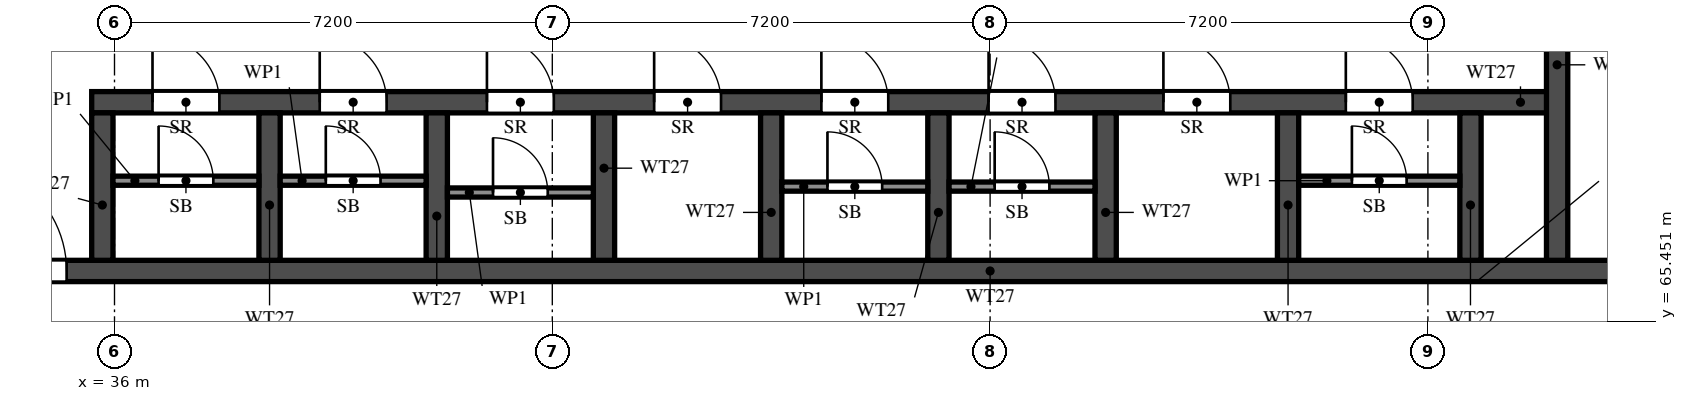
"""IFC4 building model, lengths in metres.
Left out: names, types, materials, properties, quantities, classifications, styles, units other than length and angle.
Written with IfcOpenShell. Run it as: python <this file> out.ifc"""

import sys

from ifc_helpers import new_model, si_unit, direction, frame, frame_2d, origin, place, context, subcontext, project, spatial, rectangle, extrude, element, fill, save


model = new_model("IFC4")
c1 = context("Model", 3, precision=1e-05, world=origin(), true_north=direction((0.0, 1.0)))
c2 = subcontext(c1, "Body", "Model", "MODEL_VIEW")
j1 = project(units=[si_unit("LENGTHUNIT", "METRE"), si_unit("PLANEANGLEUNIT", "RADIAN")], contexts=[c1])
p1 = place(None, origin())
s1 = spatial("IfcSite", under=j1, at=p1, CompositionType="ELEMENT")
p2 = place(p1, origin())
s2 = spatial("IfcBuilding", under=s1, at=p2, CompositionType="ELEMENT")
p3 = place(p2, frame((0.0, 0.0, 160.5)))
s3 = spatial("IfcBuildingStorey", under=s2, at=p3, CompositionType="ELEMENT", Elevation=160.5)
p4 = place(p3, frame((29.7, 66.275, 0.0), z_axis=(0.0, 0.0, 1.0), x_axis=(1.0, 0.0, 0.0)))
e1 = element("IfcWall", 1, at=p4, inside=s3, PredefinedType="SHEAR", context=c2, shape_type="SweptSolid", body=[
    extrude(rectangle(XDim=41.4, YDim=0.35, at=frame_2d((20.7, 0.0))), origin(), (0.0, 0.0, 1.0), 3.2),
])
p5 = place(p4, frame((0.925, 0.0, 0.0)))
e2 = element("IfcOpeningElement", 2, at=p5, cuts=e1, PredefinedType="OPENING", context=c2, shape_type="SweptSolid", body=[
    extrude(rectangle(XDim=1.1, YDim=2.1, at=frame_2d((0.55, 1.05))), frame((0.0, 0.185, 0.0), z_axis=(0.0, -1.0, 0.0), x_axis=(1.0, 0.0, 0.0)), (0.0, 0.0, 1.0), 0.37),
])
p6 = place(p4, frame((3.712, 0.0, 0.0)))
e3 = element("IfcOpeningElement", 3, at=p6, cuts=e1, PredefinedType="OPENING", context=c2, shape_type="SweptSolid", body=[
    extrude(rectangle(XDim=1.8, YDim=2.1, at=frame_2d((0.9, 1.05))), frame((0.0, 0.185, 0.0), z_axis=(0.0, -1.0, 0.0), x_axis=(1.0, 0.0, 0.0)), (0.0, 0.0, 1.0), 0.37),
])
p7 = place(p3, frame((35.625, 69.05, 0.0), z_axis=(0.0, 0.0, 1.0), x_axis=(1.0, 0.0, 0.0)))
e4 = element("IfcWall", 4, at=p7, inside=s3, PredefinedType="SHEAR", context=c2, shape_type="SweptSolid", body=[
    extrude(rectangle(XDim=24.1, YDim=0.35, at=frame_2d((12.05, 0.0))), origin(), (0.0, 0.0, 1.0), 3.2),
])
p8 = place(p7, frame((1.0, 0.0, 0.0)))
e5 = element("IfcOpeningElement", 5, at=p8, cuts=e4, PredefinedType="OPENING", context=c2, shape_type="SweptSolid", body=[
    extrude(rectangle(XDim=1.1, YDim=2.1, at=frame_2d((0.55, 1.05))), frame((0.0, 0.185, 0.0), z_axis=(0.0, -1.0, 0.0), x_axis=(1.0, 0.0, 0.0)), (0.0, 0.0, 1.0), 0.37),
])
p9 = place(p7, frame((3.75, 0.0, 0.0)))
e6 = element("IfcOpeningElement", 6, at=p9, cuts=e4, PredefinedType="OPENING", context=c2, shape_type="SweptSolid", body=[
    extrude(rectangle(XDim=1.1, YDim=2.1, at=frame_2d((0.55, 1.05))), frame((0.0, 0.185, 0.0), z_axis=(0.0, -1.0, 0.0), x_axis=(1.0, 0.0, 0.0)), (0.0, 0.0, 1.0), 0.37),
])
p10 = place(p7, frame((6.5, 0.0, 0.0)))
e7 = element("IfcOpeningElement", 7, at=p10, cuts=e4, PredefinedType="OPENING", context=c2, shape_type="SweptSolid", body=[
    extrude(rectangle(XDim=1.1, YDim=2.1, at=frame_2d((0.55, 1.05))), frame((0.0, 0.185, 0.0), z_axis=(0.0, -1.0, 0.0), x_axis=(1.0, 0.0, 0.0)), (0.0, 0.0, 1.0), 0.37),
])
p11 = place(p7, frame((9.25, 0.0, 0.0)))
e8 = element("IfcOpeningElement", 8, at=p11, cuts=e4, PredefinedType="OPENING", context=c2, shape_type="SweptSolid", body=[
    extrude(rectangle(XDim=1.1, YDim=2.1, at=frame_2d((0.55, 1.05))), frame((0.0, 0.185, 0.0), z_axis=(0.0, -1.0, 0.0), x_axis=(1.0, 0.0, 0.0)), (0.0, 0.0, 1.0), 0.37),
])
p12 = place(p7, frame((12.0, 0.0, 0.0)))
e9 = element("IfcOpeningElement", 9, at=p12, cuts=e4, PredefinedType="OPENING", context=c2, shape_type="SweptSolid", body=[
    extrude(rectangle(XDim=1.1, YDim=2.1, at=frame_2d((0.55, 1.05))), frame((0.0, 0.185, 0.0), z_axis=(0.0, -1.0, 0.0), x_axis=(1.0, 0.0, 0.0)), (0.0, 0.0, 1.0), 0.37),
])
p13 = place(p7, frame((14.75, 0.0, 0.0)))
e10 = element("IfcOpeningElement", 10, at=p13, cuts=e4, PredefinedType="OPENING", context=c2, shape_type="SweptSolid", body=[
    extrude(rectangle(XDim=1.1, YDim=2.1, at=frame_2d((0.55, 1.05))), frame((0.0, 0.185, 0.0), z_axis=(0.0, -1.0, 0.0), x_axis=(1.0, 0.0, 0.0)), (0.0, 0.0, 1.0), 0.37),
])
p14 = place(p7, frame((17.625, 0.0, 0.0)))
e11 = element("IfcOpeningElement", 11, at=p14, cuts=e4, PredefinedType="OPENING", context=c2, shape_type="SweptSolid", body=[
    extrude(rectangle(XDim=1.1, YDim=2.1, at=frame_2d((0.55, 1.05))), frame((0.0, 0.185, 0.0), z_axis=(0.0, -1.0, 0.0), x_axis=(1.0, 0.0, 0.0)), (0.0, 0.0, 1.0), 0.37),
])
p15 = place(p7, frame((20.625, 0.0, 0.0)))
e12 = element("IfcOpeningElement", 12, at=p15, cuts=e4, PredefinedType="OPENING", context=c2, shape_type="SweptSolid", body=[
    extrude(rectangle(XDim=1.1, YDim=2.1, at=frame_2d((0.55, 1.05))), frame((0.0, 0.185, 0.0), z_axis=(0.0, -1.0, 0.0), x_axis=(1.0, 0.0, 0.0)), (0.0, 0.0, 1.0), 0.37),
])
p16 = place(p3, frame((59.725, 66.45, 0.0), z_axis=(0.0, 0.0, 1.0), x_axis=(0.0, 1.0, 0.0)))
e13 = element("IfcWall", 13, at=p16, inside=s3, PredefinedType="SHEAR", context=c2, shape_type="SweptSolid", body=[
    extrude(rectangle(XDim=6.125, YDim=0.35, at=frame_2d((3.062, 0.0))), origin(), (0.0, 0.0, 1.0), 3.2),
])
p17 = place(p16, frame((3.85, 0.0, 0.0)))
e14 = element("IfcOpeningElement", 14, at=p17, cuts=e13, PredefinedType="OPENING", context=c2, shape_type="SweptSolid", body=[
    extrude(rectangle(XDim=1.2, YDim=2.1, at=frame_2d((0.6, 1.05))), frame((0.0, 0.185, 0.0), z_axis=(0.0, -1.0, 0.0), x_axis=(1.0, 0.0, 0.0)), (0.0, 0.0, 1.0), 0.37),
])
for number, where, z_axis, x_axis in (
    (15, (35.8, 66.45, 0.0), (0.0, 0.0, 1.0), (0.0, 1.0, 0.0)),
    (16, (38.55, 66.45, 0.0), (0.0, 0.0, 1.0), (0.0, 1.0, 0.0)),
    (17, (41.3, 66.45, 0.0), (0.0, 0.0, 1.0), (0.0, 1.0, 0.0)),
    (18, (44.05, 66.45, 0.0), (0.0, 0.0, 1.0), (0.0, 1.0, 0.0)),
    (19, (46.8, 66.45, 0.0), (0.0, 0.0, 1.0), (0.0, 1.0, 0.0)),
    (20, (49.55, 66.45, 0.0), (0.0, 0.0, 1.0), (0.0, 1.0, 0.0)),
    (21, (52.3, 66.45, 0.0), (0.0, 0.0, 1.0), (0.0, 1.0, 0.0)),
    (22, (55.3, 66.45, 0.0), (0.0, 0.0, 1.0), (0.0, 1.0, 0.0)),
    (23, (58.3, 66.45, 0.0), (0.0, 0.0, 1.0), (0.0, 1.0, 0.0)),
):
    element("IfcWall", number, at=place(p3, frame(where, z_axis=z_axis, x_axis=x_axis)), inside=s3, PredefinedType="SHEAR", context=c2, shape_type="SweptSolid", body=[
        extrude(rectangle(XDim=2.425, YDim=0.35, at=frame_2d((1.212, 0.0))), origin(), (0.0, 0.0, 1.0), 3.2),
    ])
p18 = place(p3, frame((35.975, 67.76, 0.0), z_axis=(0.0, 0.0, 1.0), x_axis=(1.0, 0.0, 0.0)))
e24 = element("IfcWall", 24, at=p18, inside=s3, PredefinedType="PARTITIONING", context=c2, shape_type="SweptSolid", body=[
    extrude(rectangle(XDim=2.4, YDim=0.15, at=frame_2d((1.2, 0.0))), origin(), (0.0, 0.0, 1.0), 3.2),
])
p19 = place(p18, frame((0.75, 0.0, 0.0)))
e25 = element("IfcOpeningElement", 25, at=p19, cuts=e24, PredefinedType="OPENING", context=c2, shape_type="SweptSolid", body=[
    extrude(rectangle(XDim=0.9, YDim=2.1, at=frame_2d((0.45, 1.05))), frame((0.0, 0.085, 0.0), z_axis=(0.0, -1.0, 0.0), x_axis=(1.0, 0.0, 0.0)), (0.0, 0.0, 1.0), 0.17),
])
p20 = place(p3, frame((38.725, 67.76, 0.0), z_axis=(0.0, 0.0, 1.0), x_axis=(1.0, 0.0, 0.0)))
e26 = element("IfcWall", 26, at=p20, inside=s3, PredefinedType="PARTITIONING", context=c2, shape_type="SweptSolid", body=[
    extrude(rectangle(XDim=2.4, YDim=0.15, at=frame_2d((1.2, 0.0))), origin(), (0.0, 0.0, 1.0), 3.2),
])
p21 = place(p20, frame((0.75, 0.0, 0.0)))
e27 = element("IfcOpeningElement", 27, at=p21, cuts=e26, PredefinedType="OPENING", context=c2, shape_type="SweptSolid", body=[
    extrude(rectangle(XDim=0.9, YDim=2.1, at=frame_2d((0.45, 1.05))), frame((0.0, 0.085, 0.0), z_axis=(0.0, -1.0, 0.0), x_axis=(1.0, 0.0, 0.0)), (0.0, 0.0, 1.0), 0.17),
])
p22 = place(p3, frame((41.475, 67.565, 0.0), z_axis=(0.0, 0.0, 1.0), x_axis=(1.0, 0.0, 0.0)))
e28 = element("IfcWall", 28, at=p22, inside=s3, PredefinedType="PARTITIONING", context=c2, shape_type="SweptSolid", body=[
    extrude(rectangle(XDim=2.4, YDim=0.15, at=frame_2d((1.2, 0.0))), origin(), (0.0, 0.0, 1.0), 3.2),
])
p23 = place(p22, frame((0.75, 0.0, 0.0)))
e29 = element("IfcOpeningElement", 29, at=p23, cuts=e28, PredefinedType="OPENING", context=c2, shape_type="SweptSolid", body=[
    extrude(rectangle(XDim=0.9, YDim=2.1, at=frame_2d((0.45, 1.05))), frame((0.0, 0.085, 0.0), z_axis=(0.0, -1.0, 0.0), x_axis=(1.0, 0.0, 0.0)), (0.0, 0.0, 1.0), 0.17),
])
p24 = place(p3, frame((46.975, 67.663, 0.0), z_axis=(0.0, 0.0, 1.0), x_axis=(1.0, 0.0, 0.0)))
e30 = element("IfcWall", 30, at=p24, inside=s3, PredefinedType="PARTITIONING", context=c2, shape_type="SweptSolid", body=[
    extrude(rectangle(XDim=2.4, YDim=0.15, at=frame_2d((1.2, 0.0))), origin(), (0.0, 0.0, 1.0), 3.2),
])
p25 = place(p24, frame((0.75, 0.0, 0.0)))
e31 = element("IfcOpeningElement", 31, at=p25, cuts=e30, PredefinedType="OPENING", context=c2, shape_type="SweptSolid", body=[
    extrude(rectangle(XDim=0.9, YDim=2.1, at=frame_2d((0.45, 1.05))), frame((0.0, 0.085, 0.0), z_axis=(0.0, -1.0, 0.0), x_axis=(1.0, 0.0, 0.0)), (0.0, 0.0, 1.0), 0.17),
])
p26 = place(p3, frame((49.725, 67.663, 0.0), z_axis=(0.0, 0.0, 1.0), x_axis=(1.0, 0.0, 0.0)))
e32 = element("IfcWall", 32, at=p26, inside=s3, PredefinedType="PARTITIONING", context=c2, shape_type="SweptSolid", body=[
    extrude(rectangle(XDim=2.4, YDim=0.15, at=frame_2d((1.2, 0.0))), origin(), (0.0, 0.0, 1.0), 3.2),
])
p27 = place(p26, frame((0.75, 0.0, 0.0)))
e33 = element("IfcOpeningElement", 33, at=p27, cuts=e32, PredefinedType="OPENING", context=c2, shape_type="SweptSolid", body=[
    extrude(rectangle(XDim=0.9, YDim=2.1, at=frame_2d((0.45, 1.05))), frame((0.0, 0.085, 0.0), z_axis=(0.0, -1.0, 0.0), x_axis=(1.0, 0.0, 0.0)), (0.0, 0.0, 1.0), 0.17),
])
p28 = place(p3, frame((55.475, 67.76, 0.0), z_axis=(0.0, 0.0, 1.0), x_axis=(1.0, 0.0, 0.0)))
e34 = element("IfcWall", 34, at=p28, inside=s3, PredefinedType="PARTITIONING", context=c2, shape_type="SweptSolid", body=[
    extrude(rectangle(XDim=2.65, YDim=0.15, at=frame_2d((1.325, 0.0))), origin(), (0.0, 0.0, 1.0), 3.2),
])
p29 = place(p28, frame((0.875, 0.0, 0.0)))
e35 = element("IfcOpeningElement", 35, at=p29, cuts=e34, PredefinedType="OPENING", context=c2, shape_type="SweptSolid", body=[
    extrude(rectangle(XDim=0.9, YDim=2.1, at=frame_2d((0.45, 1.05))), frame((0.0, 0.085, 0.0), z_axis=(0.0, -1.0, 0.0), x_axis=(1.0, 0.0, 0.0)), (0.0, 0.0, 1.0), 0.17),
])
p30 = place(p6, origin())
e36 = element("IfcDoor", 36, at=p30, inside=s3, OperationType="DOUBLE_DOOR_SINGLE_SWING", PredefinedType="DOOR", context=c2, shape_type="SweptSolid", body=[
    extrude(rectangle(XDim=1.8, YDim=2.1, at=frame_2d((0.9, 1.05))), frame((0.0, 0.025, 0.0), z_axis=(0.0, -1.0, 0.0), x_axis=(1.0, 0.0, 0.0)), (0.0, 0.0, 1.0), 0.05),
])
fill(e3, e36)
p31 = place(p8, origin())
e37 = element("IfcDoor", 37, at=p31, inside=s3, OperationType="SINGLE_SWING_RIGHT", PredefinedType="DOOR", context=c2, shape_type="SweptSolid", body=[
    extrude(rectangle(XDim=1.1, YDim=2.1, at=frame_2d((0.55, 1.05))), frame((0.0, 0.025, 0.0), z_axis=(0.0, -1.0, 0.0), x_axis=(1.0, 0.0, 0.0)), (0.0, 0.0, 1.0), 0.05),
])
fill(e5, e37)
p32 = place(p19, origin())
e38 = element("IfcDoor", 38, at=p32, inside=s3, OperationType="SINGLE_SWING_LEFT", PredefinedType="DOOR", context=c2, shape_type="SweptSolid", body=[
    extrude(rectangle(XDim=0.9, YDim=2.1, at=frame_2d((0.45, 1.05))), frame((0.0, 0.025, 0.0), z_axis=(0.0, -1.0, 0.0), x_axis=(1.0, 0.0, 0.0)), (0.0, 0.0, 1.0), 0.05),
])
fill(e25, e38)
p33 = place(p9, origin())
e39 = element("IfcDoor", 39, at=p33, inside=s3, OperationType="SINGLE_SWING_LEFT", PredefinedType="DOOR", context=c2, shape_type="SweptSolid", body=[
    extrude(rectangle(XDim=1.1, YDim=2.1, at=frame_2d((0.55, 1.05))), frame((0.0, 0.025, 0.0), z_axis=(0.0, -1.0, 0.0), x_axis=(1.0, 0.0, 0.0)), (0.0, 0.0, 1.0), 0.05),
])
fill(e6, e39)
p34 = place(p21, origin())
e40 = element("IfcDoor", 40, at=p34, inside=s3, OperationType="SINGLE_SWING_RIGHT", PredefinedType="DOOR", context=c2, shape_type="SweptSolid", body=[
    extrude(rectangle(XDim=0.9, YDim=2.1, at=frame_2d((0.45, 1.05))), frame((0.0, 0.025, 0.0), z_axis=(0.0, -1.0, 0.0), x_axis=(1.0, 0.0, 0.0)), (0.0, 0.0, 1.0), 0.05),
])
fill(e27, e40)
p35 = place(p10, origin())
e41 = element("IfcDoor", 41, at=p35, inside=s3, OperationType="SINGLE_SWING_RIGHT", PredefinedType="DOOR", context=c2, shape_type="SweptSolid", body=[
    extrude(rectangle(XDim=1.1, YDim=2.1, at=frame_2d((0.55, 1.05))), frame((0.0, 0.025, 0.0), z_axis=(0.0, -1.0, 0.0), x_axis=(1.0, 0.0, 0.0)), (0.0, 0.0, 1.0), 0.05),
])
fill(e7, e41)
p36 = place(p23, origin())
e42 = element("IfcDoor", 42, at=p36, inside=s3, OperationType="SINGLE_SWING_RIGHT", PredefinedType="DOOR", context=c2, shape_type="SweptSolid", body=[
    extrude(rectangle(XDim=0.9, YDim=2.1, at=frame_2d((0.45, 1.05))), frame((0.0, 0.025, 0.0), z_axis=(0.0, -1.0, 0.0), x_axis=(1.0, 0.0, 0.0)), (0.0, 0.0, 1.0), 0.05),
])
fill(e29, e42)
p37 = place(p11, origin())
e43 = element("IfcDoor", 43, at=p37, inside=s3, OperationType="SINGLE_SWING_LEFT", PredefinedType="DOOR", context=c2, shape_type="SweptSolid", body=[
    extrude(rectangle(XDim=1.1, YDim=2.1, at=frame_2d((0.55, 1.05))), frame((0.0, 0.025, 0.0), z_axis=(0.0, -1.0, 0.0), x_axis=(1.0, 0.0, 0.0)), (0.0, 0.0, 1.0), 0.05),
])
fill(e8, e43)
p38 = place(p12, origin())
e44 = element("IfcDoor", 44, at=p38, inside=s3, OperationType="SINGLE_SWING_RIGHT", PredefinedType="DOOR", context=c2, shape_type="SweptSolid", body=[
    extrude(rectangle(XDim=1.1, YDim=2.1, at=frame_2d((0.55, 1.05))), frame((0.0, 0.025, 0.0), z_axis=(0.0, -1.0, 0.0), x_axis=(1.0, 0.0, 0.0)), (0.0, 0.0, 1.0), 0.05),
])
fill(e9, e44)
p39 = place(p25, origin())
e45 = element("IfcDoor", 45, at=p39, inside=s3, OperationType="SINGLE_SWING_RIGHT", PredefinedType="DOOR", context=c2, shape_type="SweptSolid", body=[
    extrude(rectangle(XDim=0.9, YDim=2.1, at=frame_2d((0.45, 1.05))), frame((0.0, 0.025, 0.0), z_axis=(0.0, -1.0, 0.0), x_axis=(1.0, 0.0, 0.0)), (0.0, 0.0, 1.0), 0.05),
])
fill(e31, e45)
p40 = place(p13, origin())
e46 = element("IfcDoor", 46, at=p40, inside=s3, OperationType="SINGLE_SWING_LEFT", PredefinedType="DOOR", context=c2, shape_type="SweptSolid", body=[
    extrude(rectangle(XDim=1.1, YDim=2.1, at=frame_2d((0.55, 1.05))), frame((0.0, 0.025, 0.0), z_axis=(0.0, -1.0, 0.0), x_axis=(1.0, 0.0, 0.0)), (0.0, 0.0, 1.0), 0.05),
])
fill(e10, e46)
p41 = place(p27, origin())
e47 = element("IfcDoor", 47, at=p41, inside=s3, OperationType="SINGLE_SWING_LEFT", PredefinedType="DOOR", context=c2, shape_type="SweptSolid", body=[
    extrude(rectangle(XDim=0.9, YDim=2.1, at=frame_2d((0.45, 1.05))), frame((0.0, 0.025, 0.0), z_axis=(0.0, -1.0, 0.0), x_axis=(1.0, 0.0, 0.0)), (0.0, 0.0, 1.0), 0.05),
])
fill(e33, e47)
p42 = place(p14, origin())
e48 = element("IfcDoor", 48, at=p42, inside=s3, OperationType="SINGLE_SWING_RIGHT", PredefinedType="DOOR", context=c2, shape_type="SweptSolid", body=[
    extrude(rectangle(XDim=1.1, YDim=2.1, at=frame_2d((0.55, 1.05))), frame((0.0, 0.025, 0.0), z_axis=(0.0, -1.0, 0.0), x_axis=(1.0, 0.0, 0.0)), (0.0, 0.0, 1.0), 0.05),
])
fill(e11, e48)
p43 = place(p15, origin())
e49 = element("IfcDoor", 49, at=p43, inside=s3, OperationType="SINGLE_SWING_RIGHT", PredefinedType="DOOR", context=c2, shape_type="SweptSolid", body=[
    extrude(rectangle(XDim=1.1, YDim=2.1, at=frame_2d((0.55, 1.05))), frame((0.0, 0.025, 0.0), z_axis=(0.0, -1.0, 0.0), x_axis=(1.0, 0.0, 0.0)), (0.0, 0.0, 1.0), 0.05),
])
fill(e12, e49)
p44 = place(p29, origin())
e50 = element("IfcDoor", 50, at=p44, inside=s3, OperationType="SINGLE_SWING_LEFT", PredefinedType="DOOR", context=c2, shape_type="SweptSolid", body=[
    extrude(rectangle(XDim=0.9, YDim=2.1, at=frame_2d((0.45, 1.05))), frame((0.0, 0.025, 0.0), z_axis=(0.0, -1.0, 0.0), x_axis=(1.0, 0.0, 0.0)), (0.0, 0.0, 1.0), 0.05),
])
fill(e35, e50)
save(model, sys.argv[1])
